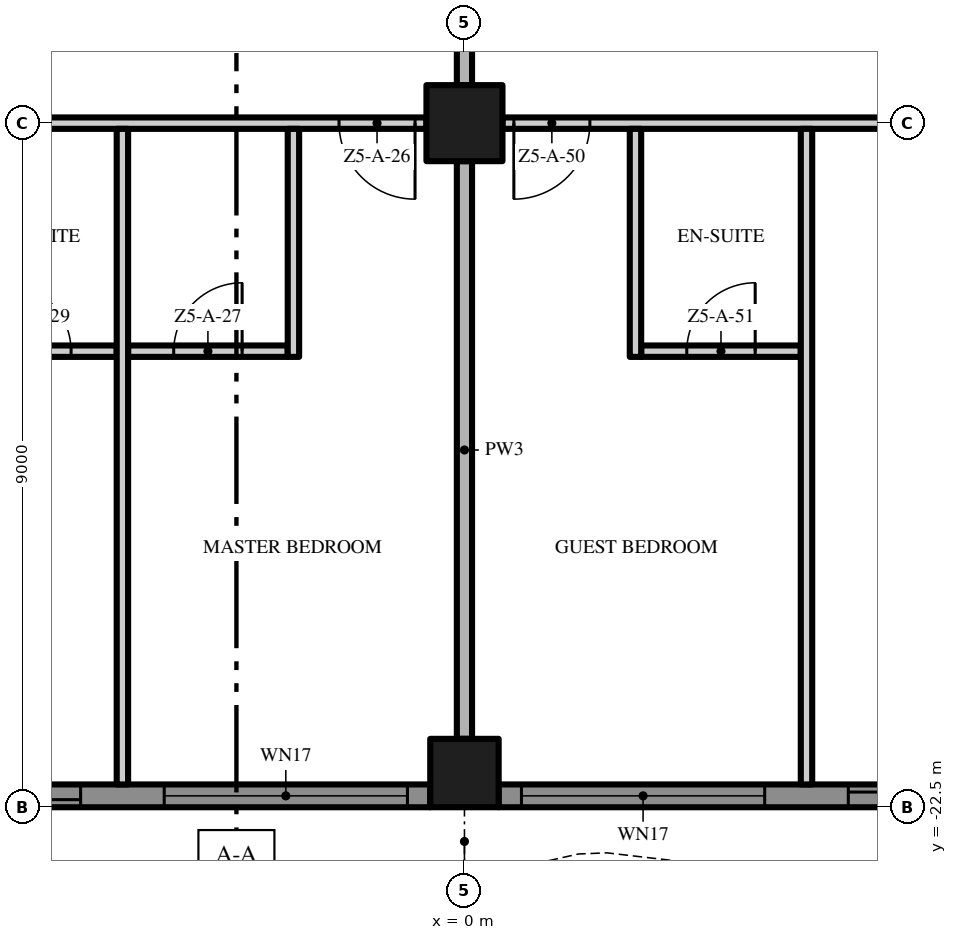
"""IFC4 building model, lengths in metres.
Left out: names, types, materials, properties, quantities, classifications, styles, units other than length and angle.
Written with IfcOpenShell. Run it as: python <this file> out.ifc"""

import sys

from ifc_helpers import new_model, si_unit, direction, frame, frame_2d, origin, origin_2d, place, context, subcontext, project, spatial, polyline, rectangle, outline, extrude, element, fill, save


model = new_model("IFC4")
c1 = context("Model", 3, precision=1e-05, world=origin(), true_north=direction((0.0, 1.0)))
c2 = subcontext(c1, "Body", "Model", "MODEL_VIEW")
j1 = project(units=[si_unit("LENGTHUNIT", "METRE"), si_unit("PLANEANGLEUNIT", "RADIAN")], contexts=[c1])
p1 = place(None, origin())
s1 = spatial("IfcSite", under=j1, at=p1, CompositionType="ELEMENT")
p2 = place(p1, origin())
s2 = spatial("IfcBuilding", under=s1, at=p2, CompositionType="ELEMENT")
p3 = place(p2, frame((0.0, 0.0, 246.4)))
s3 = spatial("IfcBuildingStorey", under=s2, at=p3, CompositionType="ELEMENT", Elevation=246.4)
p4 = place(p3, frame((0.0, -13.5, 0.0), z_axis=(0.0, 0.0, 1.0), x_axis=(1.0, 0.0, 0.0)))
e1 = element("IfcColumn", 1, at=p4, inside=s3, PredefinedType="COLUMN", context=c2, shape_type="SweptSolid", body=[
    extrude(rectangle(XDim=1.0, YDim=1.0, at=origin_2d()), origin(), (0.0, 0.0, 1.0), 3.5),
])
p5 = place(p3, frame((0.0, -22.05, 0.0), z_axis=(0.0, 0.0, 1.0), x_axis=(1.0, 0.0, 0.0)))
e2 = element("IfcColumn", 2, at=p5, inside=s3, PredefinedType="COLUMN", context=c2, shape_type="SweptSolid", body=[
    extrude(rectangle(XDim=0.9, YDim=0.9, at=origin_2d()), origin(), (0.0, 0.0, 1.0), 3.5),
])
p6 = place(p3, frame((-0.45, -22.35, 0.0), z_axis=(0.0, 0.0, 1.0), x_axis=(-1.0, 0.0, 0.0)))
e3 = element("IfcWall", 3, at=p6, inside=s3, PredefinedType="SOLIDWALL", context=c2, shape_type="SweptSolid", body=[
    extrude(rectangle(XDim=8.1, YDim=0.3, at=frame_2d((4.05, 0.0))), origin(), (0.0, 0.0, 1.0), 3.5),
])
p7 = place(p6, frame((4.6, 0.0, 0.0)))
e4 = element("IfcOpeningElement", 4, at=p7, cuts=e3, PredefinedType="OPENING", context=c2, shape_type="SweptSolid", body=[
    extrude(rectangle(XDim=3.2, YDim=2.4, at=frame_2d((1.6, 1.2))), frame((0.0, 0.16, 0.0), z_axis=(0.0, -1.0, 0.0), x_axis=(1.0, 0.0, 0.0)), (0.0, 0.0, 1.0), 0.32),
])
p8 = place(p6, frame((0.3, 0.0, 0.45)))
e5 = element("IfcOpeningElement", 5, at=p8, cuts=e3, PredefinedType="OPENING", context=c2, shape_type="SweptSolid", body=[
    extrude(rectangle(XDim=3.2, YDim=2.65, at=frame_2d((1.6, 1.325))), frame((0.0, 0.16, 0.0), z_axis=(0.0, -1.0, 0.0), x_axis=(1.0, 0.0, 0.0)), (0.0, 0.0, 1.0), 0.32),
])
p9 = place(p3, frame((8.55, -22.35, 0.0), z_axis=(0.0, 0.0, 1.0), x_axis=(-1.0, 0.0, 0.0)))
e6 = element("IfcWall", 6, at=p9, inside=s3, PredefinedType="SOLIDWALL", context=c2, shape_type="SweptSolid", body=[
    extrude(rectangle(XDim=8.1, YDim=0.3, at=frame_2d((4.05, 0.0))), origin(), (0.0, 0.0, 1.0), 3.5),
])
p10 = place(p9, frame((4.6, 0.0, 0.45)))
e7 = element("IfcOpeningElement", 7, at=p10, cuts=e6, PredefinedType="OPENING", context=c2, shape_type="SweptSolid", body=[
    extrude(rectangle(XDim=3.2, YDim=2.65, at=frame_2d((1.6, 1.325))), frame((0.0, 0.16, 0.0), z_axis=(0.0, -1.0, 0.0), x_axis=(1.0, 0.0, 0.0)), (0.0, 0.0, 1.0), 0.32),
])
p11 = place(p9, frame((0.3, 0.0, 0.0)))
e8 = element("IfcOpeningElement", 8, at=p11, cuts=e6, PredefinedType="OPENING", context=c2, shape_type="SweptSolid", body=[
    extrude(rectangle(XDim=3.2, YDim=2.4, at=frame_2d((1.6, 1.2))), frame((0.0, 0.16, 0.0), z_axis=(0.0, -1.0, 0.0), x_axis=(1.0, 0.0, 0.0)), (0.0, 0.0, 1.0), 0.32),
])
p12 = place(p3, origin())
e9 = element("IfcWall", 9, at=p12, inside=s3, PredefinedType="USERDEFINED", context=c2, shape_type="SweptSolid", body=[
    extrude(outline(polyline([(-22.5, -25.149), (-21.0, -25.485), (-20.625, -25.5), (-19.5, -25.369), (-18.0, -24.845), (-16.5, -24.112), (-15.0, -23.451), (-13.5, -23.115), (-13.125, -23.1), (-12.0, -23.231), (-10.5, -23.755), (-9.0, -24.488), (-7.5, -25.149), (-6.0, -25.485), (-5.625, -25.5), (-4.5, -25.369), (-3.0, -24.845), (-1.5, -24.112), (0.0, -23.451), (1.5, -23.115), (1.875, -23.1), (3.0, -23.231), (4.5, -23.755), (6.0, -24.488), (7.5, -25.149), (9.0, -25.485), (9.375, -25.5), (10.5, -25.369), (12.0, -24.845), (13.5, -24.112), (15.0, -23.451), (16.5, -23.115), (16.875, -23.1), (18.0, -23.231), (19.5, -23.755), (21.0, -24.488), (22.5, -25.149), (22.601, -24.92), (21.105, -24.261), (19.596, -23.524), (18.056, -22.986), (16.885, -22.849), (16.467, -22.866), (14.921, -23.213), (13.395, -23.885), (11.904, -24.614), (10.444, -25.124), (9.365, -25.249), (9.033, -25.236), (7.579, -24.91), (6.105, -24.261), (4.596, -23.524), (3.056, -22.986), (1.885, -22.849), (1.467, -22.866), (-0.079, -23.213), (-1.605, -23.885), (-3.096, -24.614), (-4.556, -25.124), (-5.635, -25.249), (-5.967, -25.236), (-7.421, -24.91), (-8.895, -24.261), (-10.404, -23.524), (-11.944, -22.986), (-13.115, -22.849), (-13.533, -22.866), (-15.079, -23.213), (-16.605, -23.885), (-18.096, -24.614), (-19.556, -25.124), (-20.635, -25.249), (-20.967, -25.236), (-22.445, -24.905), (-22.5, -25.149)])), origin(), (0.0, 0.0, 1.0), 0.9),
])
p13 = place(p3, frame((-6.675, -16.5, 0.0), z_axis=(0.0, 0.0, 1.0), x_axis=(1.0, 0.0, 0.0)))
e10 = element("IfcWall", 10, at=p13, inside=s3, PredefinedType="PARTITIONING", context=c2, shape_type="SweptSolid", body=[
    extrude(rectangle(XDim=2.1, YDim=0.15, at=frame_2d((1.05, 0.0))), origin(), (0.0, 0.0, 1.0), 3.5),
])
p14 = place(p13, frame((0.6, 0.0, 0.0)))
e11 = element("IfcOpeningElement", 11, at=p14, cuts=e10, PredefinedType="OPENING", context=c2, shape_type="SweptSolid", body=[
    extrude(rectangle(XDim=0.9, YDim=2.1, at=frame_2d((0.45, 1.05))), frame((0.0, 0.085, 0.0), z_axis=(0.0, -1.0, 0.0), x_axis=(1.0, 0.0, 0.0)), (0.0, 0.0, 1.0), 0.17),
])
p15 = place(p3, frame((-4.425, -16.5, 0.0), z_axis=(0.0, 0.0, 1.0), x_axis=(1.0, 0.0, 0.0)))
e12 = element("IfcWall", 12, at=p15, inside=s3, PredefinedType="PARTITIONING", context=c2, shape_type="SweptSolid", body=[
    extrude(rectangle(XDim=2.1, YDim=0.15, at=frame_2d((1.05, 0.0))), origin(), (0.0, 0.0, 1.0), 3.5),
])
p16 = place(p15, frame((0.6, 0.0, 0.0)))
e13 = element("IfcOpeningElement", 13, at=p16, cuts=e12, PredefinedType="OPENING", context=c2, shape_type="SweptSolid", body=[
    extrude(rectangle(XDim=0.9, YDim=2.1, at=frame_2d((0.45, 1.05))), frame((0.0, 0.085, 0.0), z_axis=(0.0, -1.0, 0.0), x_axis=(1.0, 0.0, 0.0)), (0.0, 0.0, 1.0), 0.17),
])
p17 = place(p3, frame((2.325, -16.5, 0.0), z_axis=(0.0, 0.0, 1.0), x_axis=(1.0, 0.0, 0.0)))
e14 = element("IfcWall", 14, at=p17, inside=s3, PredefinedType="PARTITIONING", context=c2, shape_type="SweptSolid", body=[
    extrude(rectangle(XDim=2.1, YDim=0.15, at=frame_2d((1.05, 0.0))), origin(), (0.0, 0.0, 1.0), 3.5),
])
p18 = place(p17, frame((0.6, 0.0, 0.0)))
e15 = element("IfcOpeningElement", 15, at=p18, cuts=e14, PredefinedType="OPENING", context=c2, shape_type="SweptSolid", body=[
    extrude(rectangle(XDim=0.9, YDim=2.1, at=frame_2d((0.45, 1.05))), frame((0.0, 0.085, 0.0), z_axis=(0.0, -1.0, 0.0), x_axis=(1.0, 0.0, 0.0)), (0.0, 0.0, 1.0), 0.17),
])
p19 = place(p3, frame((-0.5, -13.5, 0.0), z_axis=(0.0, 0.0, 1.0), x_axis=(-1.0, 0.0, 0.0)))
e16 = element("IfcWall", 16, at=p19, inside=s3, PredefinedType="PARTITIONING", context=c2, shape_type="SweptSolid", body=[
    extrude(rectangle(XDim=8.0, YDim=0.15, at=frame_2d((4.0, 0.0))), origin(), (0.0, 0.0, 1.0), 3.5),
])
p20 = place(p19, frame((0.15, 0.0, 0.0)))
e17 = element("IfcOpeningElement", 17, at=p20, cuts=e16, PredefinedType="OPENING", context=c2, shape_type="SweptSolid", body=[
    extrude(rectangle(XDim=1.0, YDim=2.4, at=frame_2d((0.5, 1.2))), frame((0.0, 0.085, 0.0), z_axis=(0.0, -1.0, 0.0), x_axis=(1.0, 0.0, 0.0)), (0.0, 0.0, 1.0), 0.17),
])
p21 = place(p19, frame((6.85, 0.0, 0.0)))
e18 = element("IfcOpeningElement", 18, at=p21, cuts=e16, PredefinedType="OPENING", context=c2, shape_type="SweptSolid", body=[
    extrude(rectangle(XDim=1.0, YDim=2.4, at=frame_2d((0.5, 1.2))), frame((0.0, 0.085, 0.0), z_axis=(0.0, -1.0, 0.0), x_axis=(1.0, 0.0, 0.0)), (0.0, 0.0, 1.0), 0.17),
])
p22 = place(p3, frame((8.5, -13.5, 0.0), z_axis=(0.0, 0.0, 1.0), x_axis=(-1.0, 0.0, 0.0)))
e19 = element("IfcWall", 19, at=p22, inside=s3, PredefinedType="PARTITIONING", context=c2, shape_type="SweptSolid", body=[
    extrude(rectangle(XDim=8.0, YDim=0.15, at=frame_2d((4.0, 0.0))), origin(), (0.0, 0.0, 1.0), 3.5),
])
p23 = place(p22, frame((1.25, 0.0, 0.0)))
e20 = element("IfcOpeningElement", 20, at=p23, cuts=e19, PredefinedType="OPENING", context=c2, shape_type="SweptSolid", body=[
    extrude(rectangle(XDim=1.0, YDim=2.4, at=frame_2d((0.5, 1.2))), frame((0.0, 0.085, 0.0), z_axis=(0.0, -1.0, 0.0), x_axis=(1.0, 0.0, 0.0)), (0.0, 0.0, 1.0), 0.17),
])
p24 = place(p22, frame((6.85, 0.0, 0.0)))
e21 = element("IfcOpeningElement", 21, at=p24, cuts=e19, PredefinedType="OPENING", context=c2, shape_type="SweptSolid", body=[
    extrude(rectangle(XDim=1.0, YDim=2.4, at=frame_2d((0.5, 1.2))), frame((0.0, 0.085, 0.0), z_axis=(0.0, -1.0, 0.0), x_axis=(1.0, 0.0, 0.0)), (0.0, 0.0, 1.0), 0.17),
])
p25 = place(p3, frame((-4.5, -22.2, 0.0), z_axis=(0.0, 0.0, 1.0), x_axis=(0.0, 1.0, 0.0)))
e22 = element("IfcWall", 22, at=p25, inside=s3, PredefinedType="PARTITIONING", context=c2, shape_type="SweptSolid", body=[
    extrude(rectangle(XDim=8.625, YDim=0.15, at=frame_2d((4.312, 0.0))), origin(), (0.0, 0.0, 1.0), 3.5),
])
p26 = place(p3, frame((-2.25, -16.575, 0.0), z_axis=(0.0, 0.0, 1.0), x_axis=(0.0, 1.0, 0.0)))
e23 = element("IfcWall", 23, at=p26, inside=s3, PredefinedType="PARTITIONING", context=c2, shape_type="SweptSolid", body=[
    extrude(rectangle(XDim=3.0, YDim=0.15, at=frame_2d((1.5, 0.0))), origin(), (0.0, 0.0, 1.0), 3.5),
])
p27 = place(p3, frame((0.0, -21.6, 0.0), z_axis=(0.0, 0.0, 1.0), x_axis=(0.0, 1.0, 0.0)))
e24 = element("IfcWall", 24, at=p27, inside=s3, PredefinedType="PARTITIONING", context=c2, shape_type="SweptSolid", body=[
    extrude(rectangle(XDim=7.6, YDim=0.2, at=frame_2d((3.8, 0.0))), origin(), (0.0, 0.0, 1.0), 3.5),
])
p28 = place(p3, frame((0.0, -13.0, 0.0), z_axis=(0.0, 0.0, 1.0), x_axis=(0.0, 1.0, 0.0)))
e25 = element("IfcWall", 25, at=p28, inside=s3, PredefinedType="PARTITIONING", context=c2, shape_type="SweptSolid", body=[
    extrude(rectangle(XDim=8.0, YDim=0.2, at=frame_2d((4.0, 0.0))), origin(), (0.0, 0.0, 1.0), 3.5),
])
p29 = place(p3, frame((2.25, -16.575, 0.0), z_axis=(0.0, 0.0, 1.0), x_axis=(0.0, 1.0, 0.0)))
e26 = element("IfcWall", 26, at=p29, inside=s3, PredefinedType="PARTITIONING", context=c2, shape_type="SweptSolid", body=[
    extrude(rectangle(XDim=3.0, YDim=0.15, at=frame_2d((1.5, 0.0))), origin(), (0.0, 0.0, 1.0), 3.5),
])
p30 = place(p3, frame((4.5, -22.2, 0.0), z_axis=(0.0, 0.0, 1.0), x_axis=(0.0, 1.0, 0.0)))
e27 = element("IfcWall", 27, at=p30, inside=s3, PredefinedType="PARTITIONING", context=c2, shape_type="SweptSolid", body=[
    extrude(rectangle(XDim=8.625, YDim=0.15, at=frame_2d((4.312, 0.0))), origin(), (0.0, 0.0, 1.0), 3.5),
])
p31 = place(p7, origin())
e28 = element("IfcDoor", 28, at=p31, inside=s3, OperationType="SINGLE_SWING_LEFT", PredefinedType="DOOR", context=c2, shape_type="SweptSolid", body=[
    extrude(rectangle(XDim=3.2, YDim=2.4, at=frame_2d((1.6, 1.2))), frame((0.0, 0.025, 0.0), z_axis=(0.0, -1.0, 0.0), x_axis=(1.0, 0.0, 0.0)), (0.0, 0.0, 1.0), 0.05),
])
fill(e4, e28)
p32 = place(p8, origin())
e29 = element("IfcWindow", 29, at=p32, inside=s3, PartitioningType="SINGLE_PANEL", PredefinedType="WINDOW", context=c2, shape_type="SweptSolid", body=[
    extrude(rectangle(XDim=3.2, YDim=2.65, at=frame_2d((1.6, 1.325))), frame((0.0, 0.03, 0.0), z_axis=(0.0, -1.0, 0.0), x_axis=(1.0, 0.0, 0.0)), (0.0, 0.0, 1.0), 0.06),
])
fill(e5, e29)
p33 = place(p10, origin())
e30 = element("IfcWindow", 30, at=p33, inside=s3, PartitioningType="SINGLE_PANEL", PredefinedType="WINDOW", context=c2, shape_type="SweptSolid", body=[
    extrude(rectangle(XDim=3.2, YDim=2.65, at=frame_2d((1.6, 1.325))), frame((0.0, 0.03, 0.0), z_axis=(0.0, -1.0, 0.0), x_axis=(1.0, 0.0, 0.0)), (0.0, 0.0, 1.0), 0.06),
])
fill(e7, e30)
p34 = place(p11, origin())
e31 = element("IfcDoor", 31, at=p34, inside=s3, OperationType="SINGLE_SWING_LEFT", PredefinedType="DOOR", context=c2, shape_type="SweptSolid", body=[
    extrude(rectangle(XDim=3.2, YDim=2.4, at=frame_2d((1.6, 1.2))), frame((0.0, 0.025, 0.0), z_axis=(0.0, -1.0, 0.0), x_axis=(1.0, 0.0, 0.0)), (0.0, 0.0, 1.0), 0.05),
])
fill(e8, e31)
p35 = place(p20, origin())
e32 = element("IfcDoor", 32, at=p35, inside=s3, OperationType="SINGLE_SWING_LEFT", PredefinedType="DOOR", context=c2, shape_type="SweptSolid", body=[
    extrude(rectangle(XDim=1.0, YDim=2.4, at=frame_2d((0.5, 1.2))), frame((0.0, 0.025, 0.0), z_axis=(0.0, -1.0, 0.0), x_axis=(1.0, 0.0, 0.0)), (0.0, 0.0, 1.0), 0.05),
])
fill(e17, e32)
p36 = place(p16, origin())
e33 = element("IfcDoor", 33, at=p36, inside=s3, OperationType="SINGLE_SWING_RIGHT", PredefinedType="DOOR", context=c2, shape_type="SweptSolid", body=[
    extrude(rectangle(XDim=0.9, YDim=2.1, at=frame_2d((0.45, 1.05))), frame((0.0, 0.025, 0.0), z_axis=(0.0, -1.0, 0.0), x_axis=(1.0, 0.0, 0.0)), (0.0, 0.0, 1.0), 0.05),
])
fill(e13, e33)
p37 = place(p14, origin())
e34 = element("IfcDoor", 34, at=p37, inside=s3, OperationType="SINGLE_SWING_LEFT", PredefinedType="DOOR", context=c2, shape_type="SweptSolid", body=[
    extrude(rectangle(XDim=0.9, YDim=2.1, at=frame_2d((0.45, 1.05))), frame((0.0, 0.025, 0.0), z_axis=(0.0, -1.0, 0.0), x_axis=(1.0, 0.0, 0.0)), (0.0, 0.0, 1.0), 0.05),
])
fill(e11, e34)
p38 = place(p24, origin())
e35 = element("IfcDoor", 35, at=p38, inside=s3, OperationType="SINGLE_SWING_RIGHT", PredefinedType="DOOR", context=c2, shape_type="SweptSolid", body=[
    extrude(rectangle(XDim=1.0, YDim=2.4, at=frame_2d((0.5, 1.2))), frame((0.0, 0.025, 0.0), z_axis=(0.0, -1.0, 0.0), x_axis=(1.0, 0.0, 0.0)), (0.0, 0.0, 1.0), 0.05),
])
fill(e21, e35)
p39 = place(p18, origin())
e36 = element("IfcDoor", 36, at=p39, inside=s3, OperationType="SINGLE_SWING_RIGHT", PredefinedType="DOOR", context=c2, shape_type="SweptSolid", body=[
    extrude(rectangle(XDim=0.9, YDim=2.1, at=frame_2d((0.45, 1.05))), frame((0.0, 0.025, 0.0), z_axis=(0.0, -1.0, 0.0), x_axis=(1.0, 0.0, 0.0)), (0.0, 0.0, 1.0), 0.05),
])
fill(e15, e36)
save(model, sys.argv[1])
